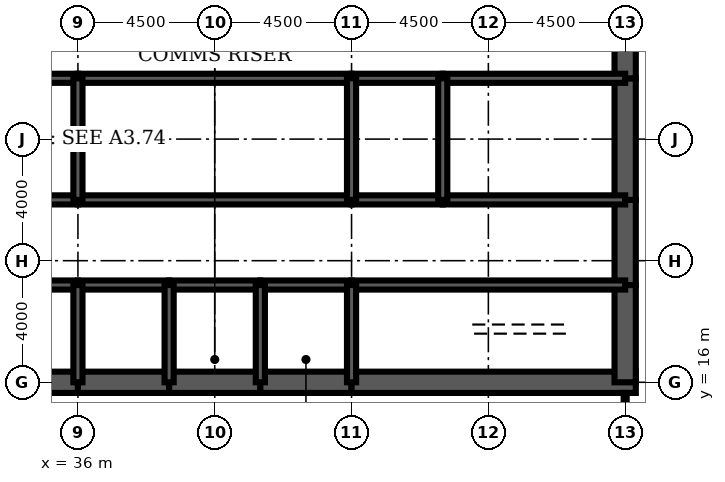
"""IFC4 building model, lengths in metres.
Left out: names, types, materials, properties, quantities, classifications, styles, units other than length and angle.
Written with IfcOpenShell. Run it as: python <this file> out.ifc"""

import sys

from ifc_helpers import new_model, si_unit, direction, frame, frame_2d, origin, place, context, subcontext, project, spatial, rectangle, extrude, element, fill, save


model = new_model("IFC4")
c1 = context("Model", 3, precision=1e-05, world=origin(), true_north=direction((0.0, 1.0)))
c2 = subcontext(c1, "Body", "Model", "MODEL_VIEW")
j1 = project(units=[si_unit("LENGTHUNIT", "METRE"), si_unit("PLANEANGLEUNIT", "RADIAN")], contexts=[c1])
p1 = place(None, origin())
s1 = spatial("IfcSite", under=j1, at=p1, CompositionType="ELEMENT")
p2 = place(p1, origin())
s2 = spatial("IfcBuilding", under=s1, at=p2, CompositionType="ELEMENT")
p3 = place(p2, frame((0.0, 0.0, 317.3)))
s3 = spatial("IfcBuildingStorey", under=s2, at=p3, CompositionType="ELEMENT", Elevation=317.3)
for number, where, z_axis, x_axis in (
    (1, (33.0, 16.0, 0.0), (0.0, 0.0, 1.0), (1.0, 0.0, 0.0)),
    (2, (36.0, 16.0, 0.0), (0.0, 0.0, 1.0), (1.0, 0.0, 0.0)),
    (3, (39.0, 16.0, 0.0), (0.0, 0.0, 1.0), (1.0, 0.0, 0.0)),
    (4, (42.0, 16.0, 0.0), (0.0, 0.0, 1.0), (1.0, 0.0, 0.0)),
):
    element("IfcWall", number, at=place(p3, frame(where, z_axis=z_axis, x_axis=x_axis)), inside=s3, PredefinedType="SHEAR", context=c2, shape_type="SweptSolid", body=[
        extrude(rectangle(XDim=3.0, YDim=0.7, at=frame_2d((1.5, 0.0))), origin(), (0.0, 0.0, 1.0), 4.2),
    ])
p4 = place(p3, frame((45.0, 16.0, 0.0), z_axis=(0.0, 0.0, 1.0), x_axis=(1.0, 0.0, 0.0)))
e5 = element("IfcWall", 5, at=p4, inside=s3, PredefinedType="SHEAR", context=c2, shape_type="SweptSolid", body=[
    extrude(rectangle(XDim=9.35, YDim=0.7, at=frame_2d((4.675, 0.0))), origin(), (0.0, 0.0, 1.0), 4.2),
])
p5 = place(p3, frame((54.0, 16.0, 0.0), z_axis=(0.0, 0.0, 1.0), x_axis=(0.0, 1.0, 0.0)))
e6 = element("IfcWall", 6, at=p5, inside=s3, PredefinedType="SHEAR", context=c2, shape_type="SweptSolid", body=[
    extrude(rectangle(XDim=3.2, YDim=0.7, at=frame_2d((1.6, 0.0))), origin(), (0.0, 0.0, 1.0), 4.2),
])
p6 = place(p3, frame((54.0, 19.2, 0.0), z_axis=(0.0, 0.0, 1.0), x_axis=(0.0, 1.0, 0.0)))
e7 = element("IfcWall", 7, at=p6, inside=s3, PredefinedType="SHEAR", context=c2, shape_type="SweptSolid", body=[
    extrude(rectangle(XDim=2.8, YDim=0.7, at=frame_2d((1.4, 0.0))), origin(), (0.0, 0.0, 1.0), 4.2),
])
p7 = place(p6, frame((0.4, 0.0, 0.0)))
e8 = element("IfcOpeningElement", 8, at=p7, cuts=e7, PredefinedType="OPENING", context=c2, shape_type="SweptSolid", body=[
    extrude(rectangle(XDim=1.8, YDim=2.1, at=frame_2d((0.9, 1.05))), frame((0.0, 0.36, 0.0), z_axis=(0.0, -1.0, 0.0), x_axis=(1.0, 0.0, 0.0)), (0.0, 0.0, 1.0), 0.72),
])
p8 = place(p3, frame((54.0, 22.0, 0.0), z_axis=(0.0, 0.0, 1.0), x_axis=(0.0, 1.0, 0.0)))
e9 = element("IfcWall", 9, at=p8, inside=s3, PredefinedType="SHEAR", context=c2, shape_type="SweptSolid", body=[
    extrude(rectangle(XDim=4.0, YDim=0.7, at=frame_2d((2.0, 0.0))), origin(), (0.0, 0.0, 1.0), 4.2),
])
p9 = place(p3, frame((54.0, 26.0, 0.0), z_axis=(0.0, 0.0, 1.0), x_axis=(0.0, 1.0, 0.0)))
e10 = element("IfcWall", 10, at=p9, inside=s3, PredefinedType="SHEAR", context=c2, shape_type="SweptSolid", body=[
    extrude(rectangle(XDim=2.8, YDim=0.7, at=frame_2d((1.4, 0.0))), origin(), (0.0, 0.0, 1.0), 4.2),
])
p10 = place(p9, frame((0.6, 0.0, 0.0)))
e11 = element("IfcOpeningElement", 11, at=p10, cuts=e10, PredefinedType="OPENING", context=c2, shape_type="SweptSolid", body=[
    extrude(rectangle(XDim=1.8, YDim=2.1, at=frame_2d((0.9, 1.05))), frame((0.0, 0.36, 0.0), z_axis=(0.0, -1.0, 0.0), x_axis=(1.0, 0.0, 0.0)), (0.0, 0.0, 1.0), 0.72),
])
p11 = place(p3, frame((33.0, 19.2, 0.0), z_axis=(0.0, 0.0, 1.0), x_axis=(1.0, 0.0, 0.0)))
e12 = element("IfcWall", 12, at=p11, inside=s3, PredefinedType="SOLIDWALL", context=c2, shape_type="SweptSolid", body=[
    extrude(rectangle(XDim=3.0, YDim=0.3, at=frame_2d((1.5, 0.0))), origin(), (0.0, 0.0, 1.0), 4.2),
])
p12 = place(p11, frame((0.95, 0.0, 0.0)))
e13 = element("IfcOpeningElement", 13, at=p12, cuts=e12, PredefinedType="OPENING", context=c2, shape_type="SweptSolid", body=[
    extrude(rectangle(XDim=1.1, YDim=2.2, at=frame_2d((0.55, 1.1))), frame((0.0, 0.16, 0.0), z_axis=(0.0, -1.0, 0.0), x_axis=(1.0, 0.0, 0.0)), (0.0, 0.0, 1.0), 0.32),
])
p13 = place(p3, frame((36.0, 19.2, 0.0), z_axis=(0.0, 0.0, 1.0), x_axis=(1.0, 0.0, 0.0)))
e14 = element("IfcWall", 14, at=p13, inside=s3, PredefinedType="SOLIDWALL", context=c2, shape_type="SweptSolid", body=[
    extrude(rectangle(XDim=3.0, YDim=0.3, at=frame_2d((1.5, 0.0))), origin(), (0.0, 0.0, 1.0), 4.2),
])
p14 = place(p13, frame((0.95, 0.0, 0.0)))
e15 = element("IfcOpeningElement", 15, at=p14, cuts=e14, PredefinedType="OPENING", context=c2, shape_type="SweptSolid", body=[
    extrude(rectangle(XDim=1.1, YDim=2.2, at=frame_2d((0.55, 1.1))), frame((0.0, 0.16, 0.0), z_axis=(0.0, -1.0, 0.0), x_axis=(1.0, 0.0, 0.0)), (0.0, 0.0, 1.0), 0.32),
])
p15 = place(p3, frame((39.0, 19.2, 0.0), z_axis=(0.0, 0.0, 1.0), x_axis=(1.0, 0.0, 0.0)))
e16 = element("IfcWall", 16, at=p15, inside=s3, PredefinedType="SOLIDWALL", context=c2, shape_type="SweptSolid", body=[
    extrude(rectangle(XDim=3.0, YDim=0.3, at=frame_2d((1.5, 0.0))), origin(), (0.0, 0.0, 1.0), 4.2),
])
p16 = place(p15, frame((1.0, 0.0, 0.0)))
e17 = element("IfcOpeningElement", 17, at=p16, cuts=e16, PredefinedType="OPENING", context=c2, shape_type="SweptSolid", body=[
    extrude(rectangle(XDim=1.0, YDim=2.1, at=frame_2d((0.5, 1.05))), frame((0.0, 0.16, 0.0), z_axis=(0.0, -1.0, 0.0), x_axis=(1.0, 0.0, 0.0)), (0.0, 0.0, 1.0), 0.32),
])
p17 = place(p3, frame((42.0, 19.2, 0.0), z_axis=(0.0, 0.0, 1.0), x_axis=(1.0, 0.0, 0.0)))
e18 = element("IfcWall", 18, at=p17, inside=s3, PredefinedType="SOLIDWALL", context=c2, shape_type="SweptSolid", body=[
    extrude(rectangle(XDim=3.0, YDim=0.3, at=frame_2d((1.5, 0.0))), origin(), (0.0, 0.0, 1.0), 4.2),
])
p18 = place(p17, frame((1.0, 0.0, 0.0)))
e19 = element("IfcOpeningElement", 19, at=p18, cuts=e18, PredefinedType="OPENING", context=c2, shape_type="SweptSolid", body=[
    extrude(rectangle(XDim=1.0, YDim=2.1, at=frame_2d((0.5, 1.05))), frame((0.0, 0.16, 0.0), z_axis=(0.0, -1.0, 0.0), x_axis=(1.0, 0.0, 0.0)), (0.0, 0.0, 1.0), 0.32),
])
p19 = place(p3, frame((45.0, 19.2, 0.0), z_axis=(0.0, 0.0, 1.0), x_axis=(1.0, 0.0, 0.0)))
e20 = element("IfcWall", 20, at=p19, inside=s3, PredefinedType="SOLIDWALL", context=c2, shape_type="SweptSolid", body=[
    extrude(rectangle(XDim=9.0, YDim=0.3, at=frame_2d((4.5, 0.0))), origin(), (0.0, 0.0, 1.0), 4.2),
])
p20 = place(p19, frame((7.35, 0.0, 0.0)))
e21 = element("IfcOpeningElement", 21, at=p20, cuts=e20, PredefinedType="OPENING", context=c2, shape_type="SweptSolid", body=[
    extrude(rectangle(XDim=1.0, YDim=2.1, at=frame_2d((0.5, 1.05))), frame((0.0, 0.16, 0.0), z_axis=(0.0, -1.0, 0.0), x_axis=(1.0, 0.0, 0.0)), (0.0, 0.0, 1.0), 0.32),
])
p21 = place(p3, frame((27.0, 22.0, 0.0), z_axis=(0.0, 0.0, 1.0), x_axis=(1.0, 0.0, 0.0)))
e22 = element("IfcWall", 22, at=p21, inside=s3, PredefinedType="SOLIDWALL", context=c2, shape_type="SweptSolid", body=[
    extrude(rectangle(XDim=9.0, YDim=0.3, at=frame_2d((4.5, 0.0))), origin(), (0.0, 0.0, 1.0), 4.2),
])
p22 = place(p21, frame((4.0, 0.0, 0.0)))
e23 = element("IfcOpeningElement", 23, at=p22, cuts=e22, PredefinedType="OPENING", context=c2, shape_type="SweptSolid", body=[
    extrude(rectangle(XDim=1.0, YDim=2.1, at=frame_2d((0.5, 1.05))), frame((0.0, 0.16, 0.0), z_axis=(0.0, -1.0, 0.0), x_axis=(1.0, 0.0, 0.0)), (0.0, 0.0, 1.0), 0.32),
])
p23 = place(p3, frame((36.0, 22.0, 0.0), z_axis=(0.0, 0.0, 1.0), x_axis=(1.0, 0.0, 0.0)))
e24 = element("IfcWall", 24, at=p23, inside=s3, PredefinedType="SOLIDWALL", context=c2, shape_type="SweptSolid", body=[
    extrude(rectangle(XDim=9.0, YDim=0.3, at=frame_2d((4.5, 0.0))), origin(), (0.0, 0.0, 1.0), 4.2),
])
p24 = place(p23, frame((4.0, 0.0, 0.0)))
e25 = element("IfcOpeningElement", 25, at=p24, cuts=e24, PredefinedType="OPENING", context=c2, shape_type="SweptSolid", body=[
    extrude(rectangle(XDim=1.0, YDim=2.1, at=frame_2d((0.5, 1.05))), frame((0.0, 0.16, 0.0), z_axis=(0.0, -1.0, 0.0), x_axis=(1.0, 0.0, 0.0)), (0.0, 0.0, 1.0), 0.32),
])
p25 = place(p3, frame((45.0, 22.0, 0.0), z_axis=(0.0, 0.0, 1.0), x_axis=(1.0, 0.0, 0.0)))
e26 = element("IfcWall", 26, at=p25, inside=s3, PredefinedType="SOLIDWALL", context=c2, shape_type="SweptSolid", body=[
    extrude(rectangle(XDim=3.0, YDim=0.3, at=frame_2d((1.5, 0.0))), origin(), (0.0, 0.0, 1.0), 4.2),
])
p26 = place(p25, frame((1.0, 0.0, 0.0)))
e27 = element("IfcOpeningElement", 27, at=p26, cuts=e26, PredefinedType="OPENING", context=c2, shape_type="SweptSolid", body=[
    extrude(rectangle(XDim=1.0, YDim=2.1, at=frame_2d((0.5, 1.05))), frame((0.0, 0.16, 0.0), z_axis=(0.0, -1.0, 0.0), x_axis=(1.0, 0.0, 0.0)), (0.0, 0.0, 1.0), 0.32),
])
p27 = place(p3, frame((48.0, 22.0, 0.0), z_axis=(0.0, 0.0, 1.0), x_axis=(1.0, 0.0, 0.0)))
e28 = element("IfcWall", 28, at=p27, inside=s3, PredefinedType="SOLIDWALL", context=c2, shape_type="SweptSolid", body=[
    extrude(rectangle(XDim=6.0, YDim=0.3, at=frame_2d((3.0, 0.0))), origin(), (0.0, 0.0, 1.0), 4.2),
])
p28 = place(p27, frame((2.0, 0.0, 0.0)))
e29 = element("IfcOpeningElement", 29, at=p28, cuts=e28, PredefinedType="OPENING", context=c2, shape_type="SweptSolid", body=[
    extrude(rectangle(XDim=1.0, YDim=2.1, at=frame_2d((0.5, 1.05))), frame((0.0, 0.16, 0.0), z_axis=(0.0, -1.0, 0.0), x_axis=(1.0, 0.0, 0.0)), (0.0, 0.0, 1.0), 0.32),
])
p29 = place(p27, frame((4.1, 0.0, 0.0)))
e30 = element("IfcOpeningElement", 30, at=p29, cuts=e28, PredefinedType="OPENING", context=c2, shape_type="SweptSolid", body=[
    extrude(rectangle(XDim=1.0, YDim=2.1, at=frame_2d((0.5, 1.05))), frame((0.0, 0.16, 0.0), z_axis=(0.0, -1.0, 0.0), x_axis=(1.0, 0.0, 0.0)), (0.0, 0.0, 1.0), 0.32),
])
for number, where, z_axis, x_axis in (
    (31, (27.0, 26.0, 0.0), (0.0, 0.0, 1.0), (1.0, 0.0, 0.0)),
    (32, (36.0, 26.0, 0.0), (0.0, 0.0, 1.0), (1.0, 0.0, 0.0)),
):
    element("IfcWall", number, at=place(p3, frame(where, z_axis=z_axis, x_axis=x_axis)), inside=s3, PredefinedType="SOLIDWALL", context=c2, shape_type="SweptSolid", body=[
        extrude(rectangle(XDim=9.0, YDim=0.3, at=frame_2d((4.5, 0.0))), origin(), (0.0, 0.0, 1.0), 4.2),
    ])
p30 = place(p3, frame((45.0, 26.0, 0.0), z_axis=(0.0, 0.0, 1.0), x_axis=(1.0, 0.0, 0.0)))
e33 = element("IfcWall", 33, at=p30, inside=s3, PredefinedType="SOLIDWALL", context=c2, shape_type="SweptSolid", body=[
    extrude(rectangle(XDim=3.0, YDim=0.3, at=frame_2d((1.5, 0.0))), origin(), (0.0, 0.0, 1.0), 4.2),
])
p31 = place(p3, frame((48.0, 26.0, 0.0), z_axis=(0.0, 0.0, 1.0), x_axis=(1.0, 0.0, 0.0)))
e34 = element("IfcWall", 34, at=p31, inside=s3, PredefinedType="SOLIDWALL", context=c2, shape_type="SweptSolid", body=[
    extrude(rectangle(XDim=6.0, YDim=0.3, at=frame_2d((3.0, 0.0))), origin(), (0.0, 0.0, 1.0), 4.2),
])
for number, where, z_axis, x_axis in (
    (35, (36.0, 16.0, 0.0), (0.0, 0.0, 1.0), (0.0, 1.0, 0.0)),
    (36, (39.0, 16.0, 0.0), (0.0, 0.0, 1.0), (0.0, 1.0, 0.0)),
    (37, (42.0, 16.0, 0.0), (0.0, 0.0, 1.0), (0.0, 1.0, 0.0)),
    (38, (45.0, 16.0, 0.0), (0.0, 0.0, 1.0), (0.0, 1.0, 0.0)),
):
    element("IfcWall", number, at=place(p3, frame(where, z_axis=z_axis, x_axis=x_axis)), inside=s3, PredefinedType="SOLIDWALL", context=c2, shape_type="SweptSolid", body=[
        extrude(rectangle(XDim=3.2, YDim=0.3, at=frame_2d((1.6, 0.0))), origin(), (0.0, 0.0, 1.0), 4.2),
    ])
for number, where, z_axis, x_axis in (
    (39, (36.0, 22.0, 0.0), (0.0, 0.0, 1.0), (0.0, 1.0, 0.0)),
    (40, (45.0, 22.0, 0.0), (0.0, 0.0, 1.0), (0.0, 1.0, 0.0)),
    (41, (48.0, 22.0, 0.0), (0.0, 0.0, 1.0), (0.0, 1.0, 0.0)),
):
    element("IfcWall", number, at=place(p3, frame(where, z_axis=z_axis, x_axis=x_axis)), inside=s3, PredefinedType="SOLIDWALL", context=c2, shape_type="SweptSolid", body=[
        extrude(rectangle(XDim=4.0, YDim=0.3, at=frame_2d((2.0, 0.0))), origin(), (0.0, 0.0, 1.0), 4.2),
    ])
p32 = place(p3, frame((39.15, 17.3, 0.0), z_axis=(0.0, 0.0, 1.0), x_axis=(1.0, 0.0, 0.0)))
e42 = element("IfcWall", 42, at=p32, inside=s3, PredefinedType="SOLIDWALL", context=c2, shape_type="SweptSolid", body=[
    extrude(rectangle(XDim=2.7, YDim=0.3, at=frame_2d((1.35, 0.0))), origin(), (0.0, 0.0, 1.0), 4.04),
])
p33 = place(p32, frame((0.85, 0.0, 0.0)))
e43 = element("IfcOpeningElement", 43, at=p33, cuts=e42, PredefinedType="OPENING", context=c2, shape_type="SweptSolid", body=[
    extrude(rectangle(XDim=1.0, YDim=2.1, at=frame_2d((0.5, 1.05))), frame((0.0, 0.16, 0.0), z_axis=(0.0, -1.0, 0.0), x_axis=(1.0, 0.0, 0.0)), (0.0, 0.0, 1.0), 0.32),
])
p34 = place(p3, frame((42.15, 17.3, 0.0), z_axis=(0.0, 0.0, 1.0), x_axis=(1.0, 0.0, 0.0)))
e44 = element("IfcWall", 44, at=p34, inside=s3, PredefinedType="SOLIDWALL", context=c2, shape_type="SweptSolid", body=[
    extrude(rectangle(XDim=2.7, YDim=0.3, at=frame_2d((1.35, 0.0))), origin(), (0.0, 0.0, 1.0), 4.04),
])
p35 = place(p34, frame((0.85, 0.0, 0.0)))
e45 = element("IfcOpeningElement", 45, at=p35, cuts=e44, PredefinedType="OPENING", context=c2, shape_type="SweptSolid", body=[
    extrude(rectangle(XDim=1.0, YDim=2.1, at=frame_2d((0.5, 1.05))), frame((0.0, 0.16, 0.0), z_axis=(0.0, -1.0, 0.0), x_axis=(1.0, 0.0, 0.0)), (0.0, 0.0, 1.0), 0.32),
])
p36 = place(p3, frame((39.0, 22.15, 0.0), z_axis=(0.0, 0.0, 1.0), x_axis=(0.0, 1.0, 0.0)))
e46 = element("IfcWall", 46, at=p36, inside=s3, PredefinedType="PARTITIONING", context=c2, shape_type="SweptSolid", body=[
    extrude(rectangle(XDim=3.7, YDim=0.15, at=frame_2d((1.85, 0.0))), origin(), (0.0, 0.0, 1.0), 3.0),
])
p37 = place(p36, frame((2.2, 0.0, 0.0)))
e47 = element("IfcOpeningElement", 47, at=p37, cuts=e46, PredefinedType="OPENING", context=c2, shape_type="SweptSolid", body=[
    extrude(rectangle(XDim=1.0, YDim=2.1, at=frame_2d((0.5, 1.05))), frame((0.0, 0.085, 0.0), z_axis=(0.0, -1.0, 0.0), x_axis=(1.0, 0.0, 0.0)), (0.0, 0.0, 1.0), 0.17),
])
p38 = place(p3, frame((51.475, 22.15, 0.0), z_axis=(0.0, 0.0, 1.0), x_axis=(0.0, 1.0, 0.0)))
e48 = element("IfcWall", 48, at=p38, inside=s3, PredefinedType="PARTITIONING", context=c2, shape_type="SweptSolid", body=[
    extrude(rectangle(XDim=3.7, YDim=0.15, at=frame_2d((1.85, 0.0))), origin(), (0.0, 0.0, 1.0), 3.0),
])
p39 = place(p3, frame((49.4, 19.35, 0.0), z_axis=(0.0, 0.0, 1.0), x_axis=(0.0, 1.0, 0.0)))
e49 = element("IfcWall", 49, at=p39, inside=s3, PredefinedType="PARTITIONING", context=c2, shape_type="SweptSolid", body=[
    extrude(rectangle(XDim=2.5, YDim=0.15, at=frame_2d((1.25, 0.0))), origin(), (0.0, 0.0, 1.0), 3.0),
])
p40 = place(p39, frame((1.15, 0.0, 0.0)))
e50 = element("IfcOpeningElement", 50, at=p40, cuts=e49, PredefinedType="OPENING", context=c2, shape_type="SweptSolid", body=[
    extrude(rectangle(XDim=1.0, YDim=2.1, at=frame_2d((0.5, 1.05))), frame((0.0, 0.085, 0.0), z_axis=(0.0, -1.0, 0.0), x_axis=(1.0, 0.0, 0.0)), (0.0, 0.0, 1.0), 0.17),
])
p41 = place(p3, frame((54.0, 2.45, 0.0), z_axis=(0.0, 0.0, 1.0), x_axis=(0.0, 1.0, 0.0)))
e51 = element("IfcWall", 51, at=p41, inside=s3, PredefinedType="PARTITIONING", context=c2, shape_type="SweptSolid", body=[
    extrude(rectangle(XDim=13.2, YDim=0.1, at=frame_2d((6.6, 0.0))), origin(), (0.0, 0.0, 1.0), 3.0),
])
p42 = place(p41, frame((2.5, 0.0, 0.0)))
e52 = element("IfcOpeningElement", 52, at=p42, cuts=e51, PredefinedType="OPENING", context=c2, shape_type="SweptSolid", body=[
    extrude(rectangle(XDim=1.6, YDim=2.1, at=frame_2d((0.8, 1.05))), frame((0.0, 0.06, 0.0), z_axis=(0.0, -1.0, 0.0), x_axis=(1.0, 0.0, 0.0)), (0.0, 0.0, 1.0), 0.12),
])
p43 = place(p41, frame((9.1, 0.0, 0.0)))
e53 = element("IfcOpeningElement", 53, at=p43, cuts=e51, PredefinedType="OPENING", context=c2, shape_type="SweptSolid", body=[
    extrude(rectangle(XDim=1.6, YDim=2.1, at=frame_2d((0.8, 1.05))), frame((0.0, 0.06, 0.0), z_axis=(0.0, -1.0, 0.0), x_axis=(1.0, 0.0, 0.0)), (0.0, 0.0, 1.0), 0.12),
])
p44 = place(p33, origin())
e54 = element("IfcDoor", 54, at=p44, inside=s3, OperationType="SINGLE_SWING_LEFT", PredefinedType="DOOR", context=c2, shape_type="SweptSolid", body=[
    extrude(rectangle(XDim=1.0, YDim=2.1, at=frame_2d((0.5, 1.05))), frame((0.0, 0.025, 0.0), z_axis=(0.0, -1.0, 0.0), x_axis=(1.0, 0.0, 0.0)), (0.0, 0.0, 1.0), 0.05),
])
fill(e43, e54)
p45 = place(p35, origin())
e55 = element("IfcDoor", 55, at=p45, inside=s3, OperationType="SINGLE_SWING_LEFT", PredefinedType="DOOR", context=c2, shape_type="SweptSolid", body=[
    extrude(rectangle(XDim=1.0, YDim=2.1, at=frame_2d((0.5, 1.05))), frame((0.0, 0.025, 0.0), z_axis=(0.0, -1.0, 0.0), x_axis=(1.0, 0.0, 0.0)), (0.0, 0.0, 1.0), 0.05),
])
fill(e45, e55)
p46 = place(p37, origin())
e56 = element("IfcDoor", 56, at=p46, inside=s3, OperationType="SINGLE_SWING_RIGHT", PredefinedType="DOOR", context=c2, shape_type="SweptSolid", body=[
    extrude(rectangle(XDim=1.0, YDim=2.1, at=frame_2d((0.5, 1.05))), frame((0.0, 0.025, 0.0), z_axis=(0.0, -1.0, 0.0), x_axis=(1.0, 0.0, 0.0)), (0.0, 0.0, 1.0), 0.05),
])
fill(e47, e56)
p47 = place(p40, origin())
e57 = element("IfcDoor", 57, at=p47, inside=s3, OperationType="SINGLE_SWING_RIGHT", PredefinedType="DOOR", context=c2, shape_type="SweptSolid", body=[
    extrude(rectangle(XDim=1.0, YDim=2.1, at=frame_2d((0.5, 1.05))), frame((0.0, 0.025, 0.0), z_axis=(0.0, -1.0, 0.0), x_axis=(1.0, 0.0, 0.0)), (0.0, 0.0, 1.0), 0.05),
])
fill(e50, e57)
p48 = place(p14, origin())
e58 = element("IfcDoor", 58, at=p48, inside=s3, OperationType="DOUBLE_DOOR_SLIDING", PredefinedType="USERDEFINED", context=c2, shape_type="SweptSolid", body=[
    extrude(rectangle(XDim=1.1, YDim=2.2, at=frame_2d((0.55, 1.1))), frame((0.0, 0.025, 0.0), z_axis=(0.0, -1.0, 0.0), x_axis=(1.0, 0.0, 0.0)), (0.0, 0.0, 1.0), 0.05),
])
fill(e15, e58)
p49 = place(p20, origin())
e59 = element("IfcDoor", 59, at=p49, inside=s3, OperationType="SINGLE_SWING_RIGHT", PredefinedType="DOOR", context=c2, shape_type="SweptSolid", body=[
    extrude(rectangle(XDim=1.0, YDim=2.1, at=frame_2d((0.5, 1.05))), frame((0.0, 0.025, 0.0), z_axis=(0.0, -1.0, 0.0), x_axis=(1.0, 0.0, 0.0)), (0.0, 0.0, 1.0), 0.05),
])
fill(e21, e59)
p50 = place(p7, origin())
e60 = element("IfcDoor", 60, at=p50, inside=s3, OperationType="SINGLE_SWING_LEFT", PredefinedType="DOOR", context=c2, shape_type="SweptSolid", body=[
    extrude(rectangle(XDim=1.8, YDim=2.1, at=frame_2d((0.9, 1.05))), frame((0.0, 0.35, 0.0), z_axis=(0.0, -1.0, 0.0), x_axis=(1.0, 0.0, 0.0)), (0.0, 0.0, 1.0), 0.699),
])
fill(e8, e60)
p51 = place(p10, origin())
e61 = element("IfcDoor", 61, at=p51, inside=s3, OperationType="SINGLE_SWING_LEFT", PredefinedType="DOOR", context=c2, shape_type="SweptSolid", body=[
    extrude(rectangle(XDim=1.8, YDim=2.1, at=frame_2d((0.9, 1.05))), frame((0.0, 0.35, 0.0), z_axis=(0.0, -1.0, 0.0), x_axis=(1.0, 0.0, 0.0)), (0.0, 0.0, 1.0), 0.699),
])
fill(e11, e61)
p52 = place(p24, origin())
e62 = element("IfcDoor", 62, at=p52, inside=s3, OperationType="SINGLE_SWING_LEFT", PredefinedType="DOOR", context=c2, shape_type="SweptSolid", body=[
    extrude(rectangle(XDim=1.0, YDim=2.1, at=frame_2d((0.5, 1.05))), frame((0.0, 0.025, 0.0), z_axis=(0.0, -1.0, 0.0), x_axis=(1.0, 0.0, 0.0)), (0.0, 0.0, 1.0), 0.05),
])
fill(e25, e62)
p53 = place(p26, origin())
e63 = element("IfcDoor", 63, at=p53, inside=s3, OperationType="SINGLE_SWING_LEFT", PredefinedType="DOOR", context=c2, shape_type="SweptSolid", body=[
    extrude(rectangle(XDim=1.0, YDim=2.1, at=frame_2d((0.5, 1.05))), frame((0.0, 0.025, 0.0), z_axis=(0.0, -1.0, 0.0), x_axis=(1.0, 0.0, 0.0)), (0.0, 0.0, 1.0), 0.05),
])
fill(e27, e63)
p54 = place(p28, origin())
e64 = element("IfcDoor", 64, at=p54, inside=s3, OperationType="SINGLE_SWING_LEFT", PredefinedType="DOOR", context=c2, shape_type="SweptSolid", body=[
    extrude(rectangle(XDim=1.0, YDim=2.1, at=frame_2d((0.5, 1.05))), frame((0.0, 0.025, 0.0), z_axis=(0.0, -1.0, 0.0), x_axis=(1.0, 0.0, 0.0)), (0.0, 0.0, 1.0), 0.05),
])
fill(e29, e64)
p55 = place(p29, origin())
e65 = element("IfcDoor", 65, at=p55, inside=s3, OperationType="SINGLE_SWING_RIGHT", PredefinedType="DOOR", context=c2, shape_type="SweptSolid", body=[
    extrude(rectangle(XDim=1.0, YDim=2.1, at=frame_2d((0.5, 1.05))), frame((0.0, 0.025, 0.0), z_axis=(0.0, -1.0, 0.0), x_axis=(1.0, 0.0, 0.0)), (0.0, 0.0, 1.0), 0.05),
])
fill(e30, e65)
p56 = place(p16, origin())
e66 = element("IfcDoor", 66, at=p56, inside=s3, OperationType="SINGLE_SWING_LEFT", PredefinedType="DOOR", context=c2, shape_type="SweptSolid", body=[
    extrude(rectangle(XDim=1.0, YDim=2.1, at=frame_2d((0.5, 1.05))), frame((0.0, 0.025, 0.0), z_axis=(0.0, -1.0, 0.0), x_axis=(1.0, 0.0, 0.0)), (0.0, 0.0, 1.0), 0.05),
])
fill(e17, e66)
p57 = place(p18, origin())
e67 = element("IfcDoor", 67, at=p57, inside=s3, OperationType="SINGLE_SWING_LEFT", PredefinedType="DOOR", context=c2, shape_type="SweptSolid", body=[
    extrude(rectangle(XDim=1.0, YDim=2.1, at=frame_2d((0.5, 1.05))), frame((0.0, 0.025, 0.0), z_axis=(0.0, -1.0, 0.0), x_axis=(1.0, 0.0, 0.0)), (0.0, 0.0, 1.0), 0.05),
])
fill(e19, e67)
save(model, sys.argv[1])
